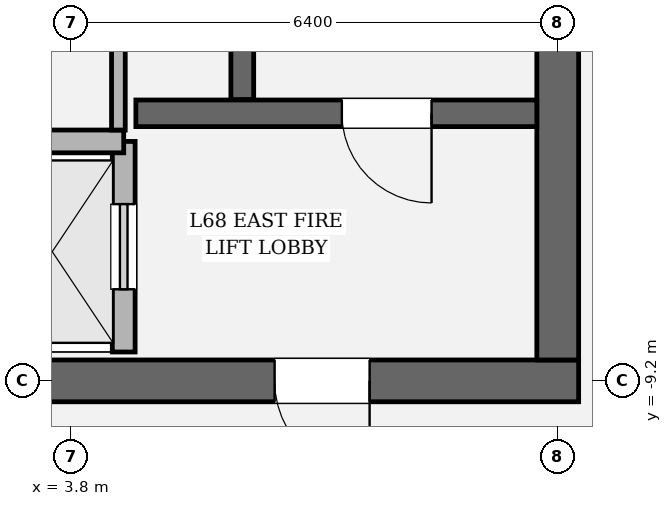
"""IFC4 building model, lengths in metres.
Left out: names, types, materials, properties, quantities, classifications, styles, units other than length and angle.
Written with IfcOpenShell. Run it as: python <this file> out.ifc"""

import sys

from ifc_helpers import new_model, si_unit, direction, frame, frame_2d, origin, place, context, subcontext, project, spatial, rectangle, extrude, element, fill, save


model = new_model("IFC4")
c1 = context("Model", 3, precision=1e-05, world=origin(), true_north=direction((0.0, 1.0)))
c2 = subcontext(c1, "Body", "Model", "MODEL_VIEW")
j1 = project(units=[si_unit("LENGTHUNIT", "METRE"), si_unit("PLANEANGLEUNIT", "RADIAN")], contexts=[c1])
p1 = place(None, origin())
s1 = spatial("IfcSite", under=j1, at=p1, CompositionType="ELEMENT")
p2 = place(p1, origin())
s2 = spatial("IfcBuilding", under=s1, at=p2, CompositionType="ELEMENT")
p3 = place(p2, frame((0.0, 0.0, 288.0)))
s3 = spatial("IfcBuildingStorey", under=s2, at=p3, CompositionType="ELEMENT", Elevation=288.0)
p4 = place(p3, frame((10.475, -9.2, 0.0), z_axis=(0.0, 0.0, 1.0), x_axis=(-1.0, 0.0, 0.0)))
e1 = element("IfcWall", 1, at=p4, inside=s3, PredefinedType="SHEAR", context=c2, shape_type="SweptSolid", body=[
    extrude(rectangle(XDim=20.95, YDim=0.55, at=frame_2d((10.475, 0.0))), origin(), (0.0, 0.0, 1.0), 4.2),
])
p5 = place(p4, frame((2.75, 0.0, 0.0)))
e2 = element("IfcOpeningElement", 2, at=p5, cuts=e1, PredefinedType="OPENING", context=c2, shape_type="SweptSolid", body=[
    extrude(rectangle(XDim=1.25, YDim=2.25, at=frame_2d((0.625, 1.125))), frame((0.0, 0.285, 0.0), z_axis=(0.0, -1.0, 0.0), x_axis=(1.0, 0.0, 0.0)), (0.0, 0.0, 1.0), 0.57),
])
p6 = place(p4, frame((16.95, 0.0, 0.0)))
e3 = element("IfcOpeningElement", 3, at=p6, cuts=e1, PredefinedType="OPENING", context=c2, shape_type="SweptSolid", body=[
    extrude(rectangle(XDim=1.25, YDim=2.25, at=frame_2d((0.625, 1.125))), frame((0.0, 0.285, 0.0), z_axis=(0.0, -1.0, 0.0), x_axis=(1.0, 0.0, 0.0)), (0.0, 0.0, 1.0), 0.57),
])
p7 = place(p3, frame((10.2, 8.925, 0.0), z_axis=(0.0, 0.0, 1.0), x_axis=(0.0, -1.0, 0.0)))
e4 = element("IfcWall", 4, at=p7, inside=s3, PredefinedType="SHEAR", context=c2, shape_type="SweptSolid", body=[
    extrude(rectangle(XDim=17.85, YDim=0.55, at=frame_2d((8.925, 0.0))), origin(), (0.0, 0.0, 1.0), 4.2),
])
p8 = place(p7, frame((3.955, 0.0, 0.0)))
e5 = element("IfcOpeningElement", 5, at=p8, cuts=e4, PredefinedType="OPENING", context=c2, shape_type="SweptSolid", body=[
    extrude(rectangle(XDim=1.18, YDim=2.2, at=frame_2d((0.59, 1.1))), frame((0.0, 0.285, 0.0), z_axis=(0.0, -1.0, 0.0), x_axis=(1.0, 0.0, 0.0)), (0.0, 0.0, 1.0), 0.57),
])
p9 = place(p3, frame((6.05, 3.45, 0.0), z_axis=(0.0, 0.0, 1.0), x_axis=(0.0, -1.0, 0.0)))
e6 = element("IfcWall", 6, at=p9, inside=s3, PredefinedType="SOLIDWALL", context=c2, shape_type="SweptSolid", body=[
    extrude(rectangle(XDim=8.95, YDim=0.3, at=frame_2d((4.475, 0.0))), origin(), (0.0, 0.0, 1.0), 4.2),
])
p10 = place(p3, frame((4.65, -5.68, 0.0), z_axis=(0.0, 0.0, 1.0), x_axis=(1.0, 0.0, 0.0)))
e7 = element("IfcWall", 7, at=p10, inside=s3, PredefinedType="SOLIDWALL", context=c2, shape_type="SweptSolid", body=[
    extrude(rectangle(XDim=5.275, YDim=0.35, at=frame_2d((2.638, 0.0))), origin(), (0.0, 0.0, 1.0), 4.2),
])
p11 = place(p10, frame((2.71, 0.0, 0.0)))
e8 = element("IfcOpeningElement", 8, at=p11, cuts=e7, PredefinedType="OPENING", context=c2, shape_type="SweptSolid", body=[
    extrude(rectangle(XDim=1.18, YDim=2.2, at=frame_2d((0.59, 1.1))), frame((0.0, 0.185, 0.0), z_axis=(0.0, -1.0, 0.0), x_axis=(1.0, 0.0, 0.0)), (0.0, 0.0, 1.0), 0.37),
])
p12 = place(p3, frame((4.49, -8.82, 0.0), z_axis=(0.0, 0.0, 1.0), x_axis=(0.0, 1.0, 0.0)))
e9 = element("IfcWall", 9, at=p12, inside=s3, PredefinedType="SOLIDWALL", context=c2, shape_type="SweptSolid", body=[
    extrude(rectangle(XDim=2.77, YDim=0.3, at=frame_2d((1.385, 0.0))), origin(), (0.0, 0.0, 1.0), 4.0),
])
p13 = place(p12, frame((0.825, 0.0, 0.0)))
e10 = element("IfcOpeningElement", 10, at=p13, cuts=e9, PredefinedType="OPENING", context=c2, shape_type="SweptSolid", body=[
    extrude(rectangle(XDim=1.12, YDim=2.25, at=frame_2d((0.56, 1.125))), frame((0.0, 0.16, 0.0), z_axis=(0.0, -1.0, 0.0), x_axis=(1.0, 0.0, 0.0)), (0.0, 0.0, 1.0), 0.32),
])
p14 = place(p3, frame((2.61, -6.05, 0.0), z_axis=(0.0, 0.0, 1.0), x_axis=(1.0, 0.0, 0.0)))
e11 = element("IfcWall", 11, at=p14, inside=s3, PredefinedType="SOLIDWALL", context=c2, shape_type="SweptSolid", body=[
    extrude(rectangle(XDim=1.88, YDim=0.3, at=frame_2d((0.94, 0.0))), origin(), (0.0, 0.0, 1.0), 4.0),
])
p15 = place(p3, frame((4.42, -5.9, 0.0), z_axis=(0.0, 0.0, 1.0), x_axis=(0.0, 1.0, 0.0)))
e12 = element("IfcWall", 12, at=p15, inside=s3, PredefinedType="PARTITIONING", context=c2, shape_type="SweptSolid", body=[
    extrude(rectangle(XDim=1.74, YDim=0.18, at=frame_2d((0.87, 0.0))), origin(), (0.0, 0.0, 1.0), 4.0),
])
p16 = place(p11, origin())
e13 = element("IfcDoor", 13, at=p16, inside=s3, OperationType="SINGLE_SWING_RIGHT", PredefinedType="DOOR", context=c2, shape_type="SweptSolid", body=[
    extrude(rectangle(XDim=1.18, YDim=2.2, at=frame_2d((0.59, 1.1))), frame((0.0, 0.025, 0.0), z_axis=(0.0, -1.0, 0.0), x_axis=(1.0, 0.0, 0.0)), (0.0, 0.0, 1.0), 0.05),
])
fill(e8, e13)
p17 = place(p5, origin())
e14 = element("IfcDoor", 14, at=p17, inside=s3, OperationType="SINGLE_SWING_LEFT", PredefinedType="DOOR", context=c2, shape_type="SweptSolid", body=[
    extrude(rectangle(XDim=1.25, YDim=2.25, at=frame_2d((0.625, 1.125))), frame((0.0, 0.025, 0.0), z_axis=(0.0, -1.0, 0.0), x_axis=(1.0, 0.0, 0.0)), (0.0, 0.0, 1.0), 0.05),
])
fill(e2, e14)
p18 = place(p13, origin())
e15 = element("IfcDoor", 15, at=p18, inside=s3, OperationType="SLIDING_TO_RIGHT", PredefinedType="DOOR", context=c2, shape_type="SweptSolid", body=[
    extrude(rectangle(XDim=1.12, YDim=2.25, at=frame_2d((0.56, 1.125))), frame((0.0, 0.025, 0.0), z_axis=(0.0, -1.0, 0.0), x_axis=(1.0, 0.0, 0.0)), (0.0, 0.0, 1.0), 0.05),
])
fill(e10, e15)
save(model, sys.argv[1])
